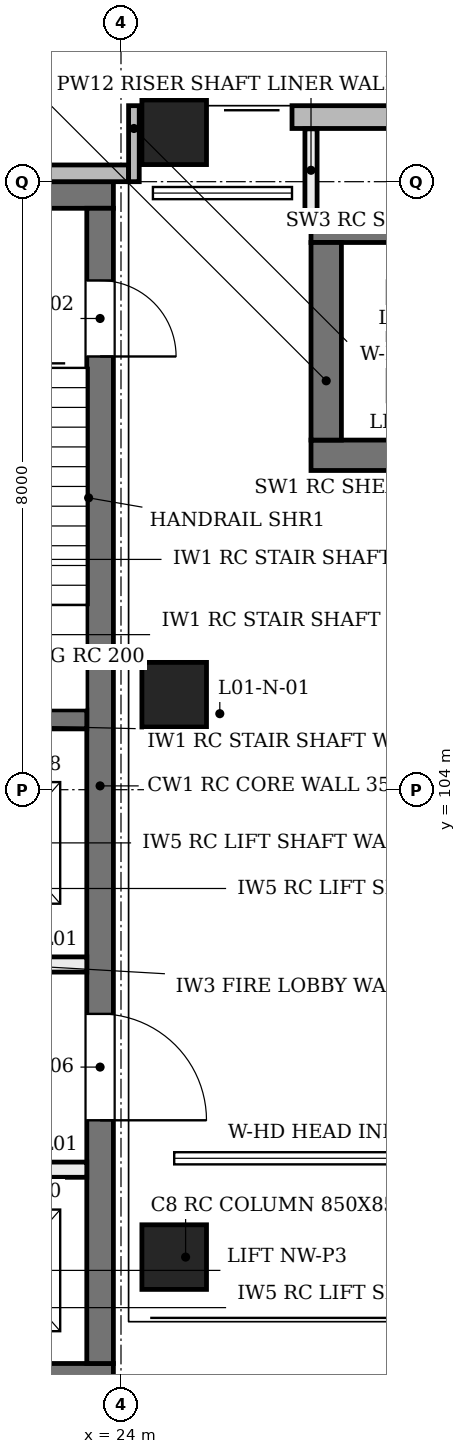
"""IFC4 building model, lengths in metres.
Left out: names, types, materials, properties, quantities, classifications, styles, units other than length and angle.
Written with IfcOpenShell. Run it as: python <this file> out.ifc"""

import sys

from ifc_helpers import new_model, si_unit, direction, frame, frame_2d, origin, origin_2d, place, context, subcontext, project, spatial, rectangle, extrude, element, fill, save


model = new_model("IFC4")
c1 = context("Model", 3, precision=1e-05, world=origin(), true_north=direction((0.0, 1.0)))
c2 = subcontext(c1, "Body", "Model", "MODEL_VIEW")
j1 = project(units=[si_unit("LENGTHUNIT", "METRE"), si_unit("PLANEANGLEUNIT", "RADIAN")], contexts=[c1])
p1 = place(None, origin())
s1 = spatial("IfcSite", under=j1, at=p1, CompositionType="ELEMENT")
p2 = place(p1, origin())
s2 = spatial("IfcBuilding", under=s1, at=p2, CompositionType="ELEMENT")
p3 = place(p2, frame((0.0, 0.0, 4.8)))
s3 = spatial("IfcBuildingStorey", under=s2, at=p3, CompositionType="ELEMENT", Elevation=4.8)
p4 = place(p3, frame((26.5, 108.4, 0.0), z_axis=(0.0, 0.0, 1.0), x_axis=(1.0, 0.0, 0.0)))
e1 = element("IfcWall", 1, at=p4, inside=s3, PredefinedType="SHEAR", context=c2, shape_type="SweptSolid", body=[
    extrude(rectangle(XDim=6.5, YDim=0.4, at=frame_2d((3.25, 0.0))), origin(), (0.0, 0.0, 1.0), 4.58),
])
p5 = place(p4, frame((1.15, 0.0, 0.0)))
e2 = element("IfcOpeningElement", 2, at=p5, cuts=e1, PredefinedType="OPENING", context=c2, shape_type="SweptSolid", body=[
    extrude(rectangle(XDim=1.1, YDim=2.1, at=frame_2d((0.55, 1.05))), frame((0.0, 0.21, 0.0), z_axis=(0.0, -1.0, 0.0), x_axis=(1.0, 0.0, 0.0)), (0.0, 0.0, 1.0), 0.42),
])
p6 = place(p4, frame((3.75, 0.0, 0.0)))
e3 = element("IfcOpeningElement", 3, at=p6, cuts=e1, PredefinedType="OPENING", context=c2, shape_type="SweptSolid", body=[
    extrude(rectangle(XDim=1.1, YDim=2.1, at=frame_2d((0.55, 1.05))), frame((0.0, 0.21, 0.0), z_axis=(0.0, -1.0, 0.0), x_axis=(1.0, 0.0, 0.0)), (0.0, 0.0, 1.0), 0.42),
])
p7 = place(p3, frame((26.5, 111.4, 0.0), z_axis=(0.0, 0.0, 1.0), x_axis=(1.0, 0.0, 0.0)))
e4 = element("IfcWall", 4, at=p7, inside=s3, PredefinedType="SHEAR", context=c2, shape_type="SweptSolid", body=[
    extrude(rectangle(XDim=6.5, YDim=0.4, at=frame_2d((3.25, 0.0))), origin(), (0.0, 0.0, 1.0), 4.58),
])
p8 = place(p3, frame((26.7, 108.6, 0.0), z_axis=(0.0, 0.0, 1.0), x_axis=(0.0, 1.0, 0.0)))
e5 = element("IfcWall", 5, at=p8, inside=s3, PredefinedType="SHEAR", context=c2, shape_type="SweptSolid", body=[
    extrude(rectangle(XDim=2.6, YDim=0.4, at=frame_2d((1.3, 0.0))), origin(), (0.0, 0.0, 1.0), 4.58),
])
for number, where, z_axis, x_axis in (
    (6, (16.0, 96.275, 0.0), (0.0, 0.0, 1.0), (1.0, 0.0, 0.0)),
    (7, (16.0, 111.825, 0.0), (0.0, 0.0, 1.0), (1.0, 0.0, 0.0)),
):
    element("IfcWall", number, at=place(p3, frame(where, z_axis=z_axis, x_axis=x_axis)), inside=s3, PredefinedType="SHEAR", context=c2, shape_type="SweptSolid", body=[
        extrude(rectangle(XDim=7.9, YDim=0.35, at=frame_2d((3.95, 0.0))), origin(), (0.0, 0.0, 1.0), 4.58),
    ])
p9 = place(p3, frame((23.725, 96.45, 0.0), z_axis=(0.0, 0.0, 1.0), x_axis=(0.0, 1.0, 0.0)))
e8 = element("IfcWall", 8, at=p9, inside=s3, PredefinedType="SHEAR", context=c2, shape_type="SweptSolid", body=[
    extrude(rectangle(XDim=15.2, YDim=0.35, at=frame_2d((7.6, 0.0))), origin(), (0.0, 0.0, 1.0), 4.58),
])
p10 = place(p9, frame((13.25, 0.0, 0.0)))
e9 = element("IfcOpeningElement", 9, at=p10, cuts=e8, PredefinedType="OPENING", context=c2, shape_type="SweptSolid", body=[
    extrude(rectangle(XDim=1.0, YDim=2.1, at=frame_2d((0.5, 1.05))), frame((0.0, 0.185, 0.0), z_axis=(0.0, -1.0, 0.0), x_axis=(1.0, 0.0, 0.0)), (0.0, 0.0, 1.0), 0.37),
])
p11 = place(p9, frame((3.2, 0.0, 0.0)))
e10 = element("IfcOpeningElement", 10, at=p11, cuts=e8, PredefinedType="OPENING", context=c2, shape_type="SweptSolid", body=[
    extrude(rectangle(XDim=1.4, YDim=2.1, at=frame_2d((0.7, 1.05))), frame((0.0, 0.185, 0.0), z_axis=(0.0, -1.0, 0.0), x_axis=(1.0, 0.0, 0.0)), (0.0, 0.0, 1.0), 0.37),
])
for number, where, z_axis, x_axis in (
    (11, (24.7, 97.6, 0.0), (0.0, 0.204, 0.979), (-1.0, 0.0, 0.0)),
    (12, (24.7, 105.0, 0.0), (0.0, 0.204, 0.979), (-1.0, 0.0, 0.0)),
    (13, (24.7, 112.4, 0.0), (0.0, 0.204, 0.979), (-1.0, 0.0, 0.0)),
):
    element("IfcColumn", number, at=place(p3, frame(where, z_axis=z_axis, x_axis=x_axis)), inside=s3, PredefinedType="COLUMN", context=c2, shape_type="SweptSolid", body=[
        extrude(rectangle(XDim=0.85, YDim=0.85, at=origin_2d()), origin(), (0.0, 0.0, 1.0), 4.903),
    ])
p12 = place(p3, frame((26.25, 112.85, 0.0), z_axis=(0.0, 0.0, 1.0), x_axis=(1.0, 0.0, 0.0)))
e14 = element("IfcWall", 14, at=p12, inside=s3, PredefinedType="SOLIDWALL", context=c2, shape_type="SweptSolid", body=[
    extrude(rectangle(XDim=51.5, YDim=0.3, at=frame_2d((25.75, 0.0))), origin(), (0.0, 0.0, 1.0), 3.9),
])
p13 = place(p3, frame((24.9, 99.15, 4.1), z_axis=(0.0, 0.0, 1.0), x_axis=(1.0, 0.0, 0.0)))
e15 = element("IfcWall", 15, at=p13, inside=s3, PredefinedType="SOLIDWALL", context=c2, shape_type="SweptSolid", body=[
    extrude(rectangle(XDim=6.9, YDim=0.15, at=frame_2d((3.45, 0.0))), origin(), (0.0, 0.0, 1.0), 0.48),
])
p14 = place(p3, frame((15.9, 112.11, 0.0), z_axis=(0.0, 0.0, 1.0), x_axis=(1.0, 0.0, 0.0)))
e16 = element("IfcWall", 16, at=p14, inside=s3, PredefinedType="SOLIDWALL", context=c2, shape_type="SweptSolid", body=[
    extrude(rectangle(XDim=8.2, YDim=0.22, at=frame_2d((4.1, 0.0))), origin(), (0.0, 0.0, 1.0), 3.9),
])
p15 = place(p14, frame((1.108, 0.0, 0.9)))
e17 = element("IfcOpeningElement", 17, at=p15, cuts=e16, PredefinedType="OPENING", context=c2, shape_type="SweptSolid", body=[
    extrude(rectangle(XDim=0.45, YDim=2.6, at=frame_2d((0.225, 1.3))), frame((0.0, 0.12, 0.0), z_axis=(0.0, -1.0, 0.0), x_axis=(1.0, 0.0, 0.0)), (0.0, 0.0, 1.0), 0.24),
])
p16 = place(p14, frame((3.775, 0.0, 0.9)))
e18 = element("IfcOpeningElement", 18, at=p16, cuts=e16, PredefinedType="OPENING", context=c2, shape_type="SweptSolid", body=[
    extrude(rectangle(XDim=0.45, YDim=2.6, at=frame_2d((0.225, 1.3))), frame((0.0, 0.12, 0.0), z_axis=(0.0, -1.0, 0.0), x_axis=(1.0, 0.0, 0.0)), (0.0, 0.0, 1.0), 0.24),
])
p17 = place(p14, frame((6.442, 0.0, 0.9)))
e19 = element("IfcOpeningElement", 19, at=p17, cuts=e16, PredefinedType="OPENING", context=c2, shape_type="SweptSolid", body=[
    extrude(rectangle(XDim=0.45, YDim=2.6, at=frame_2d((0.225, 1.3))), frame((0.0, 0.12, 0.0), z_axis=(0.0, -1.0, 0.0), x_axis=(1.0, 0.0, 0.0)), (0.0, 0.0, 1.0), 0.24),
])
p18 = place(p3, frame((24.17, 112.0, 0.0), z_axis=(0.0, 0.0, 1.0), x_axis=(0.0, 1.0, 0.0)))
e20 = element("IfcWall", 20, at=p18, inside=s3, PredefinedType="SOLIDWALL", context=c2, shape_type="SweptSolid", body=[
    extrude(rectangle(XDim=1.0, YDim=0.14, at=frame_2d((0.5, 0.0))), origin(), (0.0, 0.0, 1.0), 3.9),
])
p19 = place(p3, frame((20.45, 104.925, 0.0), z_axis=(0.0, 0.0, 1.0), x_axis=(1.0, 0.0, 0.0)))
e21 = element("IfcWall", 21, at=p19, inside=s3, PredefinedType="SOLIDWALL", context=c2, shape_type="SweptSolid", body=[
    extrude(rectangle(XDim=3.1, YDim=0.25, at=frame_2d((1.55, 0.0))), origin(), (0.0, 0.0, 1.0), 4.55),
])
p20 = place(p3, frame((16.35, 101.7, 0.0), z_axis=(0.0, 0.0, 1.0), x_axis=(1.0, 0.0, 0.0)))
e22 = element("IfcWall", 22, at=p20, inside=s3, PredefinedType="SOLIDWALL", context=c2, shape_type="SweptSolid", body=[
    extrude(rectangle(XDim=7.2, YDim=0.2, at=frame_2d((3.6, 0.0))), origin(), (0.0, 0.0, 1.0), 4.55),
])
p21 = place(p20, frame((0.5, 0.0, 0.0)))
e23 = element("IfcOpeningElement", 23, at=p21, cuts=e22, PredefinedType="OPENING", context=c2, shape_type="SweptSolid", body=[
    extrude(rectangle(XDim=1.1, YDim=2.1, at=frame_2d((0.55, 1.05))), frame((0.0, 0.11, 0.0), z_axis=(0.0, -1.0, 0.0), x_axis=(1.0, 0.0, 0.0)), (0.0, 0.0, 1.0), 0.22),
])
p22 = place(p20, frame((5.6, 0.0, 0.0)))
e24 = element("IfcOpeningElement", 24, at=p22, cuts=e22, PredefinedType="OPENING", context=c2, shape_type="SweptSolid", body=[
    extrude(rectangle(XDim=1.1, YDim=2.1, at=frame_2d((0.55, 1.05))), frame((0.0, 0.11, 0.0), z_axis=(0.0, -1.0, 0.0), x_axis=(1.0, 0.0, 0.0)), (0.0, 0.0, 1.0), 0.22),
])
p23 = place(p20, frame((3.1, 0.0, 0.0)))
e25 = element("IfcOpeningElement", 25, at=p23, cuts=e22, PredefinedType="OPENING", context=c2, shape_type="SweptSolid", body=[
    extrude(rectangle(XDim=1.0, YDim=2.1, at=frame_2d((0.5, 1.05))), frame((0.0, 0.11, 0.0), z_axis=(0.0, -1.0, 0.0), x_axis=(1.0, 0.0, 0.0)), (0.0, 0.0, 1.0), 0.22),
])
p24 = place(p3, frame((16.35, 99.0, 0.0), z_axis=(0.0, 0.0, 1.0), x_axis=(1.0, 0.0, 0.0)))
e26 = element("IfcWall", 26, at=p24, inside=s3, PredefinedType="SOLIDWALL", context=c2, shape_type="SweptSolid", body=[
    extrude(rectangle(XDim=7.2, YDim=0.2, at=frame_2d((3.6, 0.0))), origin(), (0.0, 0.0, 1.0), 4.55),
])
p25 = place(p24, frame((0.5, 0.0, 0.0)))
e27 = element("IfcOpeningElement", 27, at=p25, cuts=e26, PredefinedType="OPENING", context=c2, shape_type="SweptSolid", body=[
    extrude(rectangle(XDim=1.1, YDim=2.1, at=frame_2d((0.55, 1.05))), frame((0.0, 0.11, 0.0), z_axis=(0.0, -1.0, 0.0), x_axis=(1.0, 0.0, 0.0)), (0.0, 0.0, 1.0), 0.22),
])
p26 = place(p24, frame((5.6, 0.0, 0.0)))
e28 = element("IfcOpeningElement", 28, at=p26, cuts=e26, PredefinedType="OPENING", context=c2, shape_type="SweptSolid", body=[
    extrude(rectangle(XDim=1.1, YDim=2.1, at=frame_2d((0.55, 1.05))), frame((0.0, 0.11, 0.0), z_axis=(0.0, -1.0, 0.0), x_axis=(1.0, 0.0, 0.0)), (0.0, 0.0, 1.0), 0.22),
])
p27 = place(p24, frame((3.1, 0.0, 0.0)))
e29 = element("IfcOpeningElement", 29, at=p27, cuts=e26, PredefinedType="OPENING", context=c2, shape_type="SweptSolid", body=[
    extrude(rectangle(XDim=1.0, YDim=2.1, at=frame_2d((0.5, 1.05))), frame((0.0, 0.11, 0.0), z_axis=(0.0, -1.0, 0.0), x_axis=(1.0, 0.0, 0.0)), (0.0, 0.0, 1.0), 0.22),
])
p28 = place(p3, frame((26.5, 111.605, 0.0), z_axis=(0.0, 0.0, 1.0), x_axis=(0.0, 1.0, 0.0)))
e30 = element("IfcWall", 30, at=p28, inside=s3, PredefinedType="PARTITIONING", context=c2, shape_type="SweptSolid", body=[
    extrude(rectangle(XDim=1.09, YDim=0.16, at=frame_2d((0.545, 0.0))), origin(), (0.0, 0.0, 1.0), 4.56),
])
p29 = place(p10, frame((1.0, 0.0, 0.0), z_axis=(0.0, 0.0, 1.0), x_axis=(-1.0, 0.0, 0.0)))
e31 = element("IfcDoor", 31, at=p29, inside=s3, OperationType="SINGLE_SWING_LEFT", PredefinedType="DOOR", context=c2, shape_type="SweptSolid", body=[
    extrude(rectangle(XDim=1.0, YDim=2.1, at=frame_2d((0.5, 1.05))), frame((0.0, 0.025, 0.0), z_axis=(0.0, -1.0, 0.0), x_axis=(1.0, 0.0, 0.0)), (0.0, 0.0, 1.0), 0.05),
])
fill(e9, e31)
p30 = place(p11, frame((1.4, 0.0, 0.0), z_axis=(0.0, 0.0, 1.0), x_axis=(-1.0, 0.0, 0.0)))
e32 = element("IfcDoor", 32, at=p30, inside=s3, OperationType="SINGLE_SWING_LEFT", PredefinedType="DOOR", context=c2, shape_type="SweptSolid", body=[
    extrude(rectangle(XDim=1.4, YDim=2.1, at=frame_2d((0.7, 1.05))), frame((0.0, 0.025, 0.0), z_axis=(0.0, -1.0, 0.0), x_axis=(1.0, 0.0, 0.0)), (0.0, 0.0, 1.0), 0.05),
])
fill(e10, e32)
save(model, sys.argv[1])
